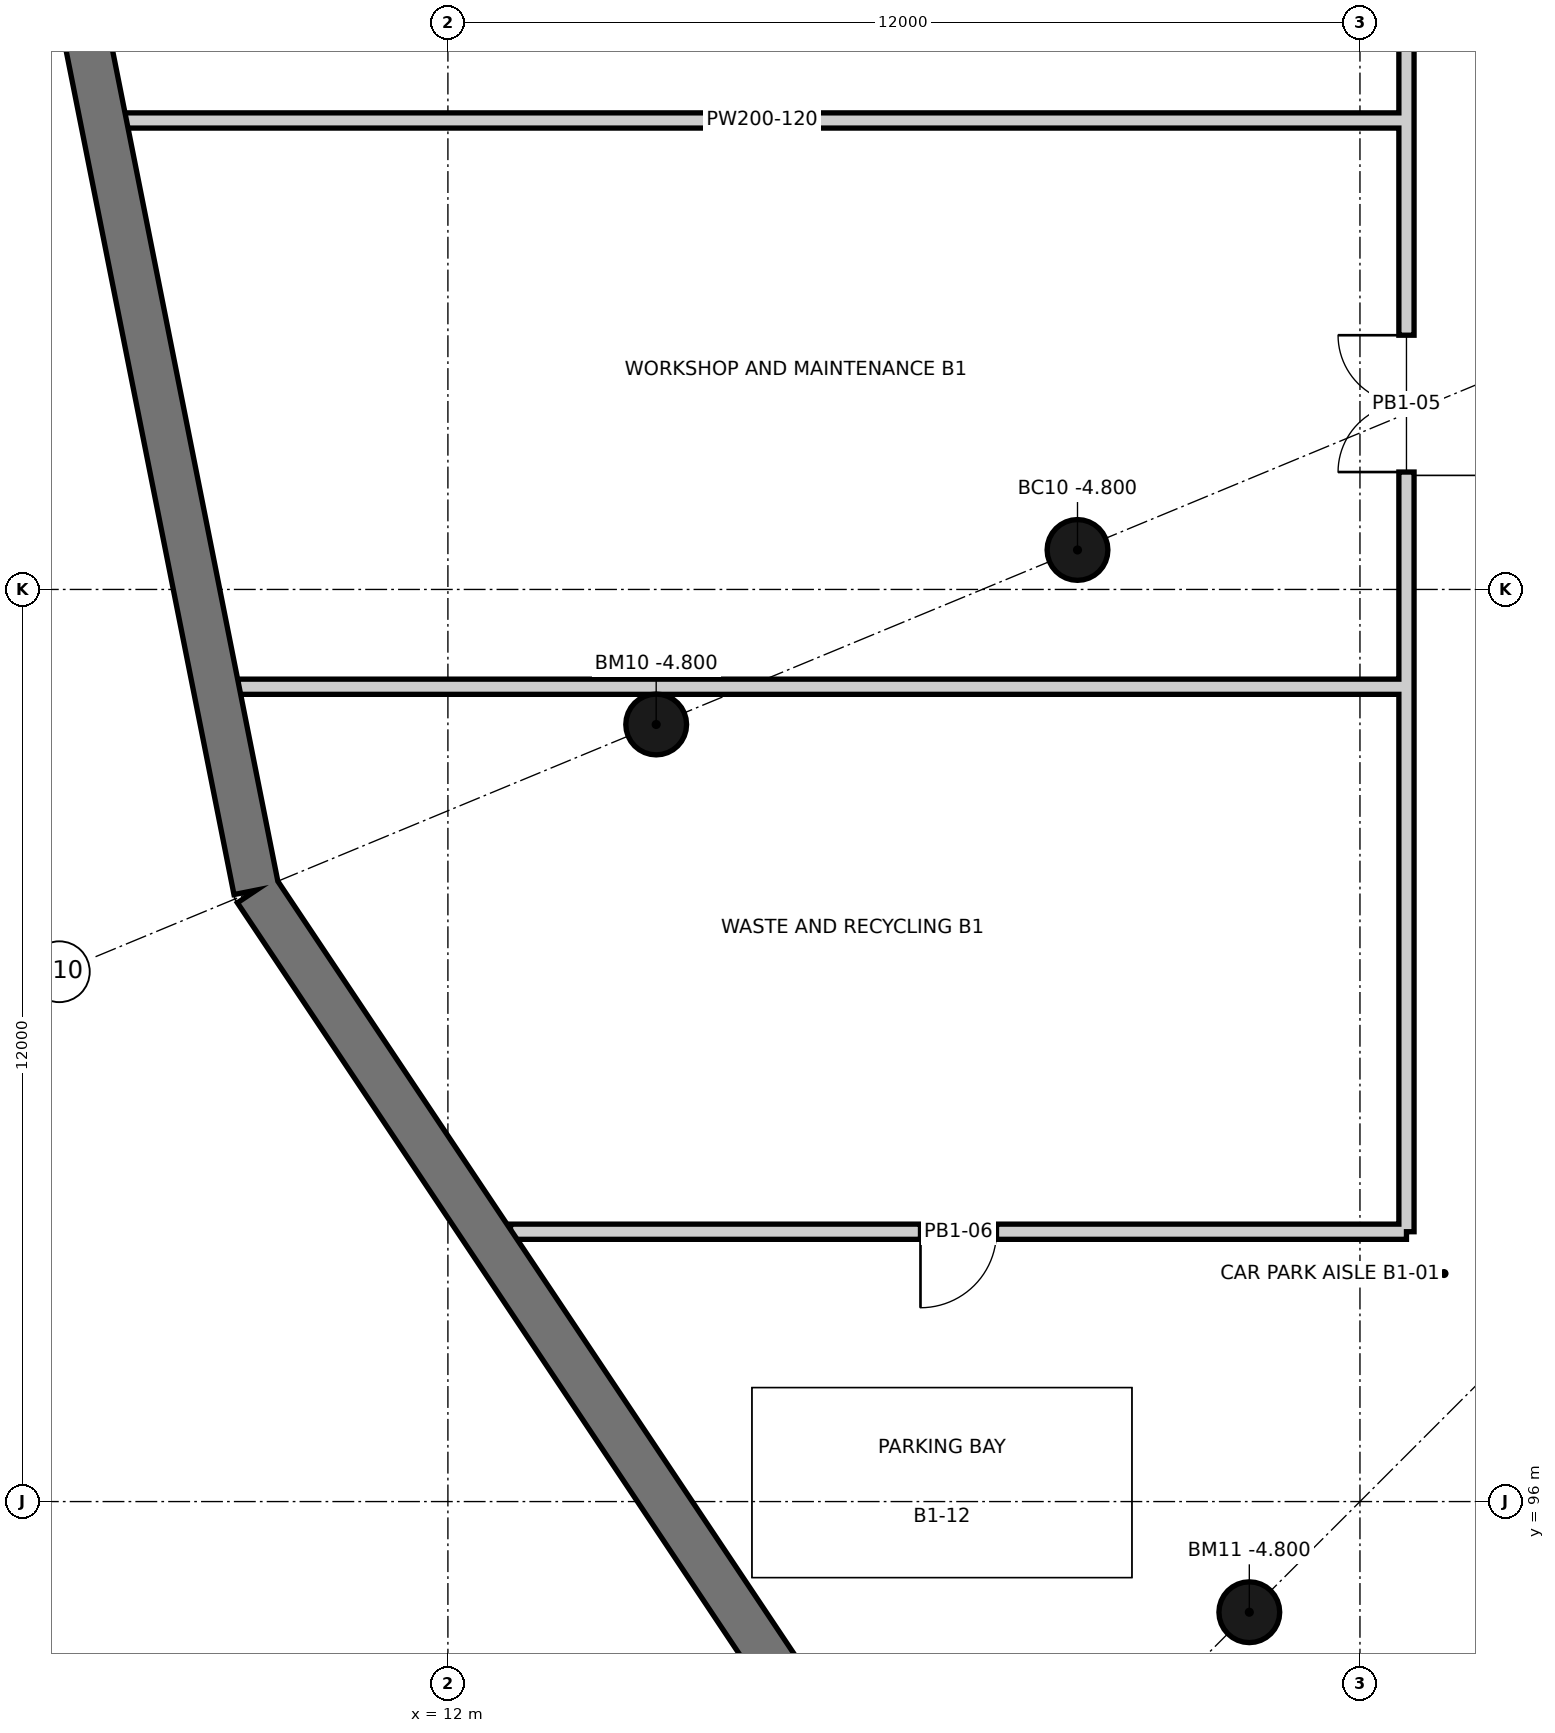
"""IFC4 building model, lengths in metres.
Left out: names, types, materials, properties, quantities, classifications, styles, units other than length and angle.
Written with IfcOpenShell. Run it as: python <this file> out.ifc"""

import sys

from ifc_helpers import new_model, si_unit, direction, frame, frame_2d, origin, origin_2d, place, context, subcontext, project, spatial, polyline, rectangle, circle, outline, extrude, element, fill, save


model = new_model("IFC4")
c1 = context("Model", 3, precision=1e-05, world=origin(), true_north=direction((0.0, 1.0)))
c2 = subcontext(c1, "Body", "Model", "MODEL_VIEW")
j1 = project(units=[si_unit("LENGTHUNIT", "METRE"), si_unit("PLANEANGLEUNIT", "RADIAN")], contexts=[c1])
p1 = place(None, origin())
s1 = spatial("IfcSite", under=j1, at=p1, CompositionType="ELEMENT")
p2 = place(p1, origin())
s2 = spatial("IfcBuilding", under=s1, at=p2, CompositionType="ELEMENT")
p3 = place(p2, frame((0.0, 0.0, -4.2)))
s3 = spatial("IfcBuildingStorey", under=s2, at=p3, CompositionType="ELEMENT", Elevation=-4.2)
for number, where, z_axis, x_axis in (
    (1, (20.284, 108.52, -0.6), (0.0, 0.0, 1.0), (1.0, 0.0, 0.0)),
    (2, (14.74, 106.223, -0.6), (0.0, 0.0, 1.0), (1.0, 0.0, 0.0)),
    (3, (22.544, 94.544, -0.6), (0.0, 0.0, 1.0), (1.0, 0.0, 0.0)),
):
    element("IfcColumn", number, at=place(p3, frame(where, z_axis=z_axis, x_axis=x_axis)), inside=s3, PredefinedType="COLUMN", context=c2, shape_type="SweptSolid", body=[
        extrude(circle(Radius=0.4, at=origin_2d()), origin(), (0.0, 0.0, 1.0), 4.35),
    ])
p4 = place(p3, frame((6.306, 120.0, -0.6), z_axis=(0.0, 0.0, 1.0), x_axis=(0.195094380607, -0.980784473091, 0.0)))
e4 = element("IfcWall", 4, at=p4, inside=s3, PredefinedType="SOLIDWALL", context=c2, shape_type="SweptSolid", body=[
    extrude(outline(polyline([(-0.06, -0.3), (16.328, -0.3), (16.208, 0.3), (0.06, 0.3), (-0.06, -0.3)])), origin(), (0.0, 0.0, 1.0), 4.8),
])
p5 = place(p3, frame((9.48, 104.044, -0.6), z_axis=(0.0, 0.0, 1.0), x_axis=(0.555565694596, -0.831472644762, 0.0)))
e5 = element("IfcWall", 5, at=p5, inside=s3, PredefinedType="SOLIDWALL", context=c2, shape_type="SweptSolid", body=[
    extrude(outline(polyline([(-0.06, -0.3), (16.328, -0.3), (16.209, 0.3), (0.06, 0.3), (-0.06, -0.3)])), origin(), (0.0, 0.0, 1.0), 4.8),
])
p6 = place(p3, frame((24.517, 114.17, 0.0), z_axis=(0.0, 0.0, 1.0), x_axis=(-1.0, 0.0, 0.0)))
e6 = element("IfcWall", 6, at=p6, inside=s3, PredefinedType="SOLIDWALL", context=c2, shape_type="SweptSolid", body=[
    extrude(rectangle(XDim=16.765, YDim=0.2, at=frame_2d((8.383, 0.0))), origin(), (0.0, 0.0, 1.0), 3.75),
])
p7 = place(p3, frame((24.612, 128.05, 0.0), z_axis=(0.0, 0.0, 1.0), x_axis=(0.0, -1.0, 0.0)))
e7 = element("IfcWall", 7, at=p7, inside=s3, PredefinedType="SOLIDWALL", context=c2, shape_type="SweptSolid", body=[
    extrude(rectangle(XDim=13.88, YDim=0.2, at=frame_2d((6.94, 0.0))), origin(), (0.0, 0.0, 1.0), 3.75),
])
p8 = place(p7, frame((6.04, 0.0, 0.0)))
e8 = element("IfcOpeningElement", 8, at=p8, cuts=e7, PredefinedType="OPENING", context=c2, shape_type="SweptSolid", body=[
    extrude(rectangle(XDim=1.8, YDim=2.1, at=frame_2d((0.9, 1.05))), frame((0.0, 0.11, 0.0), z_axis=(0.0, -1.0, 0.0), x_axis=(1.0, 0.0, 0.0)), (0.0, 0.0, 1.0), 0.22),
])
p9 = place(p3, frame((24.517, 106.72, 0.0), z_axis=(0.0, 0.0, 1.0), x_axis=(-1.0, 0.0, 0.0)))
e9 = element("IfcWall", 9, at=p9, inside=s3, PredefinedType="SOLIDWALL", context=c2, shape_type="SweptSolid", body=[
    extrude(rectangle(XDim=15.283, YDim=0.2, at=frame_2d((7.642, 0.0))), origin(), (0.0, 0.0, 1.0), 3.75),
])
p10 = place(p3, frame((24.612, 114.17, 0.0), z_axis=(0.0, 0.0, 1.0), x_axis=(0.0, -1.0, 0.0)))
e10 = element("IfcWall", 10, at=p10, inside=s3, PredefinedType="SOLIDWALL", context=c2, shape_type="SweptSolid", body=[
    extrude(rectangle(XDim=7.45, YDim=0.2, at=frame_2d((3.725, 0.0))), origin(), (0.0, 0.0, 1.0), 3.75),
])
p11 = place(p10, frame((2.825, 0.0, 0.0)))
e11 = element("IfcOpeningElement", 11, at=p11, cuts=e10, PredefinedType="OPENING", context=c2, shape_type="SweptSolid", body=[
    extrude(rectangle(XDim=1.8, YDim=2.1, at=frame_2d((0.9, 1.05))), frame((0.0, 0.11, 0.0), z_axis=(0.0, -1.0, 0.0), x_axis=(1.0, 0.0, 0.0)), (0.0, 0.0, 1.0), 0.22),
])
p12 = place(p3, frame((24.612, 106.72, 0.0), z_axis=(0.0, 0.0, 1.0), x_axis=(0.0, -1.0, 0.0)))
e12 = element("IfcWall", 12, at=p12, inside=s3, PredefinedType="SOLIDWALL", context=c2, shape_type="SweptSolid", body=[
    extrude(rectangle(XDim=7.17, YDim=0.2, at=frame_2d((3.585, 0.0))), origin(), (0.0, 0.0, 1.0), 3.75),
])
p13 = place(p3, frame((24.612, 99.55, 0.0), z_axis=(0.0, 0.0, 1.0), x_axis=(-1.0, 0.0, 0.0)))
e13 = element("IfcWall", 13, at=p13, inside=s3, PredefinedType="SOLIDWALL", context=c2, shape_type="SweptSolid", body=[
    extrude(rectangle(XDim=11.788, YDim=0.2, at=frame_2d((5.894, 0.0))), origin(), (0.0, 0.0, 1.0), 3.75),
])
p14 = place(p13, frame((5.394, 0.0, 0.0)))
e14 = element("IfcOpeningElement", 14, at=p14, cuts=e13, PredefinedType="OPENING", context=c2, shape_type="SweptSolid", body=[
    extrude(rectangle(XDim=1.0, YDim=2.1, at=frame_2d((0.5, 1.05))), frame((0.0, 0.11, 0.0), z_axis=(0.0, -1.0, 0.0), x_axis=(1.0, 0.0, 0.0)), (0.0, 0.0, 1.0), 0.22),
])
p15 = place(p11, frame((1.8, 0.0, 0.0), z_axis=(0.0, 0.0, 1.0), x_axis=(-1.0, 0.0, 0.0)))
e15 = element("IfcDoor", 15, at=p15, inside=s3, OperationType="DOUBLE_DOOR_SINGLE_SWING", PredefinedType="DOOR", context=c2, shape_type="SweptSolid", body=[
    extrude(rectangle(XDim=1.8, YDim=2.1, at=frame_2d((0.9, 1.05))), frame((0.0, 0.025, 0.0), z_axis=(0.0, -1.0, 0.0), x_axis=(1.0, 0.0, 0.0)), (0.0, 0.0, 1.0), 0.05),
])
fill(e11, e15)
p16 = place(p14, origin())
e16 = element("IfcDoor", 16, at=p16, inside=s3, OperationType="SINGLE_SWING_RIGHT", PredefinedType="DOOR", context=c2, shape_type="SweptSolid", body=[
    extrude(rectangle(XDim=1.0, YDim=2.1, at=frame_2d((0.5, 1.05))), frame((0.0, 0.025, 0.0), z_axis=(0.0, -1.0, 0.0), x_axis=(1.0, 0.0, 0.0)), (0.0, 0.0, 1.0), 0.05),
])
fill(e14, e16)
save(model, sys.argv[1])
